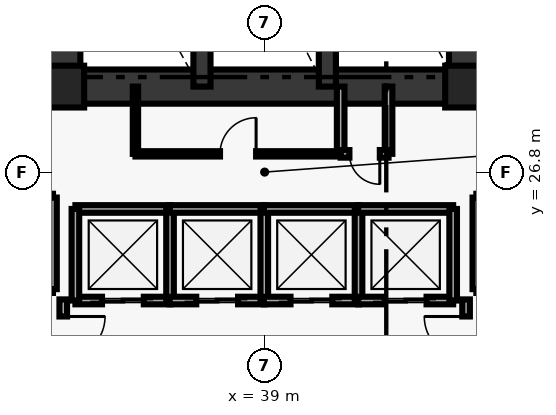
"""IFC4 building model, lengths in metres.
Left out: names, types, materials, properties, quantities, classifications, styles, units other than length and angle.
Written with IfcOpenShell. Run it as: python <this file> out.ifc"""

import sys

from ifc_helpers import new_model, si_unit, direction, frame, frame_2d, origin, origin_2d, place, context, subcontext, project, spatial, rectangle, extrude, element, fill, save


model = new_model("IFC4")
c1 = context("Model", 3, precision=1e-05, world=origin(), true_north=direction((0.0, 1.0)))
c2 = subcontext(c1, "Body", "Model", "MODEL_VIEW")
j1 = project(units=[si_unit("LENGTHUNIT", "METRE"), si_unit("PLANEANGLEUNIT", "RADIAN")], contexts=[c1])
p1 = place(None, origin())
s1 = spatial("IfcSite", under=j1, at=p1, CompositionType="ELEMENT")
p2 = place(p1, origin())
s2 = spatial("IfcBuilding", under=s1, at=p2, CompositionType="ELEMENT")
p3 = place(p2, origin())
s3 = spatial("IfcBuildingStorey", under=s2, at=p3, CompositionType="ELEMENT", Elevation=0.0)
for number, where, z_axis, x_axis in (
    (1, (44.3, 29.05, 0.0), (0.0, 0.0, 1.0), (1.0, 0.0, 0.0)),
    (2, (33.7, 29.05, 0.0), (0.0, 0.0, 1.0), (1.0, 0.0, 0.0)),
):
    element("IfcColumn", number, at=place(p3, frame(where, z_axis=z_axis, x_axis=x_axis)), inside=s3, PredefinedType="PILASTER", context=c2, shape_type="SweptSolid", body=[
        extrude(rectangle(XDim=1.1, YDim=1.1, at=origin_2d()), origin(), (0.0, 0.0, 1.0), 5.7),
    ])
for number, where, z_axis, x_axis in (
    (3, (33.7, 29.05, 0.0), (0.0, 0.0, 1.0), (0.0, 1.0, 0.0)),
    (4, (44.3, 29.05, 0.0), (0.0, 0.0, 1.0), (0.0, 1.0, 0.0)),
):
    element("IfcWall", number, at=place(p3, frame(where, z_axis=z_axis, x_axis=x_axis)), inside=s3, PredefinedType="SHEAR", context=c2, shape_type="SweptSolid", body=[
        extrude(rectangle(XDim=8.35, YDim=0.9, at=frame_2d((4.175, 0.0))), origin(), (0.0, 0.0, 1.0), 5.7),
    ])
p4 = place(p3, frame((33.7, 29.05, 0.0), z_axis=(0.0, 0.0, 1.0), x_axis=(1.0, 0.0, 0.0)))
e5 = element("IfcWall", 5, at=p4, inside=s3, PredefinedType="SHEAR", context=c2, shape_type="SweptSolid", body=[
    extrude(rectangle(XDim=10.6, YDim=0.9, at=frame_2d((5.3, 0.0))), origin(), (0.0, 0.0, 1.0), 5.7),
])
for number, where, z_axis, x_axis in (
    (6, (37.35, 29.05, 0.0), (0.0, 0.0, 1.0), (0.0, 1.0, 0.0)),
    (7, (40.65, 29.05, 0.0), (0.0, 0.0, 1.0), (0.0, 1.0, 0.0)),
):
    element("IfcWall", number, at=place(p3, frame(where, z_axis=z_axis, x_axis=x_axis)), inside=s3, PredefinedType="SHEAR", context=c2, shape_type="SweptSolid", body=[
        extrude(rectangle(XDim=8.35, YDim=0.45, at=frame_2d((4.175, 0.0))), origin(), (0.0, 0.0, 1.0), 5.7),
    ])
p5 = place(p3, frame((35.6, 27.28, 0.0), z_axis=(0.0, 0.0, 1.0), x_axis=(0.0, 1.0, 0.0)))
e8 = element("IfcWall", 8, at=p5, inside=s3, PredefinedType="PARTITIONING", context=c2, shape_type="SweptSolid", body=[
    extrude(rectangle(XDim=1.77, YDim=0.14, at=frame_2d((0.885, 0.0))), origin(), (0.0, 0.0, 1.0), 5.7),
])
for number, where, z_axis, x_axis in (
    (9, (41.0, 27.28, 0.0), (0.0, 0.0, 1.0), (0.0, 1.0, 0.0)),
    (10, (42.26, 27.28, 0.0), (0.0, 0.0, 1.0), (0.0, 1.0, 0.0)),
):
    element("IfcWall", number, at=place(p3, frame(where, z_axis=z_axis, x_axis=x_axis)), inside=s3, PredefinedType="SOLIDWALL", context=c2, shape_type="SweptSolid", body=[
        extrude(rectangle(XDim=1.77, YDim=0.2, at=frame_2d((0.885, 0.0))), origin(), (0.0, 0.0, 1.0), 5.7),
    ])
p6 = place(p3, frame((41.0, 27.28, 0.0), z_axis=(0.0, 0.0, 1.0), x_axis=(1.0, 0.0, 0.0)))
e11 = element("IfcWall", 11, at=p6, inside=s3, PredefinedType="SOLIDWALL", context=c2, shape_type="SweptSolid", body=[
    extrude(rectangle(XDim=1.26, YDim=0.2, at=frame_2d((0.63, 0.0))), origin(), (0.0, 0.0, 1.0), 5.7),
])
p7 = place(p6, frame((0.23, 0.0, 0.0)))
e12 = element("IfcOpeningElement", 12, at=p7, cuts=e11, PredefinedType="OPENING", context=c2, shape_type="SweptSolid", body=[
    extrude(rectangle(XDim=0.8, YDim=2.05, at=frame_2d((0.4, 1.025))), frame((0.0, 0.11, 0.0), z_axis=(0.0, -1.0, 0.0), x_axis=(1.0, 0.0, 0.0)), (0.0, 0.0, 1.0), 0.22),
])
p8 = place(p3, frame((31.32, 23.72, 0.0), z_axis=(0.0, 0.0, 1.0), x_axis=(1.0, 0.0, 0.0)))
e13 = element("IfcWall", 13, at=p8, inside=s3, PredefinedType="SOLIDWALL", context=c2, shape_type="SweptSolid", body=[
    extrude(rectangle(XDim=2.11, YDim=0.2, at=frame_2d((1.055, 0.0))), origin(), (0.0, 0.0, 1.0), 5.7),
])
p9 = place(p8, frame((0.505, 0.0, 0.0)))
e14 = element("IfcOpeningElement", 14, at=p9, cuts=e13, PredefinedType="OPENING", context=c2, shape_type="SweptSolid", body=[
    extrude(rectangle(XDim=1.1, YDim=2.15, at=frame_2d((0.55, 1.075))), frame((0.0, 0.11, 0.0), z_axis=(0.0, -1.0, 0.0), x_axis=(1.0, 0.0, 0.0)), (0.0, 0.0, 1.0), 0.22),
])
p10 = place(p3, frame((31.32, 26.13, 0.0), z_axis=(0.0, 0.0, 1.0), x_axis=(1.0, 0.0, 0.0)))
e15 = element("IfcWall", 15, at=p10, inside=s3, PredefinedType="SOLIDWALL", context=c2, shape_type="SweptSolid", body=[
    extrude(rectangle(XDim=2.11, YDim=0.2, at=frame_2d((1.055, 0.0))), origin(), (0.0, 0.0, 1.0), 5.7),
])
p11 = place(p3, frame((33.43, 23.72, 0.0), z_axis=(0.0, 0.0, 1.0), x_axis=(0.0, 1.0, 0.0)))
e16 = element("IfcWall", 16, at=p11, inside=s3, PredefinedType="SOLIDWALL", context=c2, shape_type="SweptSolid", body=[
    extrude(rectangle(XDim=2.41, YDim=0.2, at=frame_2d((1.205, 0.0))), origin(), (0.0, 0.0, 1.0), 5.7),
])
p12 = place(p3, frame((44.57, 23.72, 0.0), z_axis=(0.0, 0.0, 1.0), x_axis=(1.0, 0.0, 0.0)))
e17 = element("IfcWall", 17, at=p12, inside=s3, PredefinedType="SOLIDWALL", context=c2, shape_type="SweptSolid", body=[
    extrude(rectangle(XDim=2.11, YDim=0.2, at=frame_2d((1.055, 0.0))), origin(), (0.0, 0.0, 1.0), 5.7),
])
p13 = place(p12, frame((0.505, 0.0, 0.0)))
e18 = element("IfcOpeningElement", 18, at=p13, cuts=e17, PredefinedType="OPENING", context=c2, shape_type="SweptSolid", body=[
    extrude(rectangle(XDim=1.1, YDim=2.15, at=frame_2d((0.55, 1.075))), frame((0.0, 0.11, 0.0), z_axis=(0.0, -1.0, 0.0), x_axis=(1.0, 0.0, 0.0)), (0.0, 0.0, 1.0), 0.22),
])
p14 = place(p3, frame((44.57, 26.13, 0.0), z_axis=(0.0, 0.0, 1.0), x_axis=(1.0, 0.0, 0.0)))
e19 = element("IfcWall", 19, at=p14, inside=s3, PredefinedType="SOLIDWALL", context=c2, shape_type="SweptSolid", body=[
    extrude(rectangle(XDim=2.11, YDim=0.2, at=frame_2d((1.055, 0.0))), origin(), (0.0, 0.0, 1.0), 5.7),
])
p15 = place(p3, frame((44.57, 23.72, 0.0), z_axis=(0.0, 0.0, 1.0), x_axis=(0.0, 1.0, 0.0)))
e20 = element("IfcWall", 20, at=p15, inside=s3, PredefinedType="SOLIDWALL", context=c2, shape_type="SweptSolid", body=[
    extrude(rectangle(XDim=2.41, YDim=0.2, at=frame_2d((1.205, 0.0))), origin(), (0.0, 0.0, 1.0), 5.7),
])
p16 = place(p3, frame((34.02, 23.42, 0.0), z_axis=(0.0, 0.0, 1.0), x_axis=(1.0, 0.0, 0.0)))
e21 = element("IfcWall", 21, at=p16, inside=s3, PredefinedType="SOLIDWALL", context=c2, shape_type="SweptSolid", body=[
    extrude(rectangle(XDim=2.5, YDim=0.2, at=frame_2d((1.25, 0.0))), origin(), (0.0, 0.0, 1.0), 5.7),
])
p17 = place(p16, frame((0.7, 0.0, 0.0)))
e22 = element("IfcOpeningElement", 22, at=p17, cuts=e21, PredefinedType="OPENING", context=c2, shape_type="SweptSolid", body=[
    extrude(rectangle(XDim=1.1, YDim=2.15, at=frame_2d((0.55, 1.075))), frame((0.0, 0.11, 0.0), z_axis=(0.0, -1.0, 0.0), x_axis=(1.0, 0.0, 0.0)), (0.0, 0.0, 1.0), 0.22),
])
p18 = place(p3, frame((34.02, 25.83, 0.0), z_axis=(0.0, 0.0, 1.0), x_axis=(1.0, 0.0, 0.0)))
e23 = element("IfcWall", 23, at=p18, inside=s3, PredefinedType="SOLIDWALL", context=c2, shape_type="SweptSolid", body=[
    extrude(rectangle(XDim=2.5, YDim=0.2, at=frame_2d((1.25, 0.0))), origin(), (0.0, 0.0, 1.0), 5.7),
])
for number, where, z_axis, x_axis in (
    (24, (34.02, 23.42, 0.0), (0.0, 0.0, 1.0), (0.0, 1.0, 0.0)),
    (25, (36.51, 23.42, 0.0), (0.0, 0.0, 1.0), (0.0, 1.0, 0.0)),
):
    element("IfcWall", number, at=place(p3, frame(where, z_axis=z_axis, x_axis=x_axis)), inside=s3, PredefinedType="SOLIDWALL", context=c2, shape_type="SweptSolid", body=[
        extrude(rectangle(XDim=2.41, YDim=0.2, at=frame_2d((1.205, 0.0))), origin(), (0.0, 0.0, 1.0), 5.7),
    ])
p19 = place(p3, frame((36.5, 23.42, 0.0), z_axis=(0.0, 0.0, 1.0), x_axis=(1.0, 0.0, 0.0)))
e26 = element("IfcWall", 26, at=p19, inside=s3, PredefinedType="SOLIDWALL", context=c2, shape_type="SweptSolid", body=[
    extrude(rectangle(XDim=2.5, YDim=0.2, at=frame_2d((1.25, 0.0))), origin(), (0.0, 0.0, 1.0), 5.7),
])
p20 = place(p19, frame((0.7, 0.0, 0.0)))
e27 = element("IfcOpeningElement", 27, at=p20, cuts=e26, PredefinedType="OPENING", context=c2, shape_type="SweptSolid", body=[
    extrude(rectangle(XDim=1.1, YDim=2.15, at=frame_2d((0.55, 1.075))), frame((0.0, 0.11, 0.0), z_axis=(0.0, -1.0, 0.0), x_axis=(1.0, 0.0, 0.0)), (0.0, 0.0, 1.0), 0.22),
])
p21 = place(p3, frame((36.5, 25.83, 0.0), z_axis=(0.0, 0.0, 1.0), x_axis=(1.0, 0.0, 0.0)))
e28 = element("IfcWall", 28, at=p21, inside=s3, PredefinedType="SOLIDWALL", context=c2, shape_type="SweptSolid", body=[
    extrude(rectangle(XDim=2.5, YDim=0.2, at=frame_2d((1.25, 0.0))), origin(), (0.0, 0.0, 1.0), 5.7),
])
p22 = place(p3, frame((38.99, 23.42, 0.0), z_axis=(0.0, 0.0, 1.0), x_axis=(0.0, 1.0, 0.0)))
e29 = element("IfcWall", 29, at=p22, inside=s3, PredefinedType="SOLIDWALL", context=c2, shape_type="SweptSolid", body=[
    extrude(rectangle(XDim=2.41, YDim=0.2, at=frame_2d((1.205, 0.0))), origin(), (0.0, 0.0, 1.0), 5.7),
])
p23 = place(p3, frame((38.98, 23.42, 0.0), z_axis=(0.0, 0.0, 1.0), x_axis=(1.0, 0.0, 0.0)))
e30 = element("IfcWall", 30, at=p23, inside=s3, PredefinedType="SOLIDWALL", context=c2, shape_type="SweptSolid", body=[
    extrude(rectangle(XDim=2.5, YDim=0.2, at=frame_2d((1.25, 0.0))), origin(), (0.0, 0.0, 1.0), 5.7),
])
p24 = place(p23, frame((0.7, 0.0, 0.0)))
e31 = element("IfcOpeningElement", 31, at=p24, cuts=e30, PredefinedType="OPENING", context=c2, shape_type="SweptSolid", body=[
    extrude(rectangle(XDim=1.1, YDim=2.15, at=frame_2d((0.55, 1.075))), frame((0.0, 0.11, 0.0), z_axis=(0.0, -1.0, 0.0), x_axis=(1.0, 0.0, 0.0)), (0.0, 0.0, 1.0), 0.22),
])
p25 = place(p3, frame((38.98, 25.83, 0.0), z_axis=(0.0, 0.0, 1.0), x_axis=(1.0, 0.0, 0.0)))
e32 = element("IfcWall", 32, at=p25, inside=s3, PredefinedType="SOLIDWALL", context=c2, shape_type="SweptSolid", body=[
    extrude(rectangle(XDim=2.5, YDim=0.2, at=frame_2d((1.25, 0.0))), origin(), (0.0, 0.0, 1.0), 5.7),
])
p26 = place(p3, frame((41.47, 23.42, 0.0), z_axis=(0.0, 0.0, 1.0), x_axis=(0.0, 1.0, 0.0)))
e33 = element("IfcWall", 33, at=p26, inside=s3, PredefinedType="SOLIDWALL", context=c2, shape_type="SweptSolid", body=[
    extrude(rectangle(XDim=2.41, YDim=0.2, at=frame_2d((1.205, 0.0))), origin(), (0.0, 0.0, 1.0), 5.7),
])
p27 = place(p3, frame((41.46, 23.42, 0.0), z_axis=(0.0, 0.0, 1.0), x_axis=(1.0, 0.0, 0.0)))
e34 = element("IfcWall", 34, at=p27, inside=s3, PredefinedType="SOLIDWALL", context=c2, shape_type="SweptSolid", body=[
    extrude(rectangle(XDim=2.5, YDim=0.2, at=frame_2d((1.25, 0.0))), origin(), (0.0, 0.0, 1.0), 5.7),
])
p28 = place(p27, frame((0.7, 0.0, 0.0)))
e35 = element("IfcOpeningElement", 35, at=p28, cuts=e34, PredefinedType="OPENING", context=c2, shape_type="SweptSolid", body=[
    extrude(rectangle(XDim=1.1, YDim=2.15, at=frame_2d((0.55, 1.075))), frame((0.0, 0.11, 0.0), z_axis=(0.0, -1.0, 0.0), x_axis=(1.0, 0.0, 0.0)), (0.0, 0.0, 1.0), 0.22),
])
p29 = place(p3, frame((41.46, 25.83, 0.0), z_axis=(0.0, 0.0, 1.0), x_axis=(1.0, 0.0, 0.0)))
e36 = element("IfcWall", 36, at=p29, inside=s3, PredefinedType="SOLIDWALL", context=c2, shape_type="SweptSolid", body=[
    extrude(rectangle(XDim=2.5, YDim=0.2, at=frame_2d((1.25, 0.0))), origin(), (0.0, 0.0, 1.0), 5.7),
])
p30 = place(p3, frame((43.96, 23.42, 0.0), z_axis=(0.0, 0.0, 1.0), x_axis=(0.0, 1.0, 0.0)))
e37 = element("IfcWall", 37, at=p30, inside=s3, PredefinedType="SOLIDWALL", context=c2, shape_type="SweptSolid", body=[
    extrude(rectangle(XDim=2.41, YDim=0.2, at=frame_2d((1.205, 0.0))), origin(), (0.0, 0.0, 1.0), 5.7),
])
p31 = place(p3, frame((33.7, 21.35, 0.0), z_axis=(0.0, 0.0, 1.0), x_axis=(0.0, 1.0, 0.0)))
e38 = element("IfcWall", 38, at=p31, inside=s3, PredefinedType="SOLIDWALL", context=c2, shape_type="SweptSolid", body=[
    extrude(rectangle(XDim=2.1, YDim=0.2, at=frame_2d((1.05, 0.0))), origin(), (0.0, 0.0, 1.0), 4.92),
])
p32 = place(p31, frame((0.55, 0.0, 0.0)))
e39 = element("IfcOpeningElement", 39, at=p32, cuts=e38, PredefinedType="OPENING", context=c2, shape_type="SweptSolid", body=[
    extrude(rectangle(XDim=1.1, YDim=2.15, at=frame_2d((0.55, 1.075))), frame((0.0, 0.11, 0.0), z_axis=(0.0, -1.0, 0.0), x_axis=(1.0, 0.0, 0.0)), (0.0, 0.0, 1.0), 0.22),
])
p33 = place(p3, frame((44.3, 23.45, 0.0), z_axis=(0.0, 0.0, 1.0), x_axis=(0.0, -1.0, 0.0)))
e40 = element("IfcWall", 40, at=p33, inside=s3, PredefinedType="SOLIDWALL", context=c2, shape_type="SweptSolid", body=[
    extrude(rectangle(XDim=2.1, YDim=0.2, at=frame_2d((1.05, 0.0))), origin(), (0.0, 0.0, 1.0), 4.92),
])
p34 = place(p33, frame((0.45, 0.0, 0.0)))
e41 = element("IfcOpeningElement", 41, at=p34, cuts=e40, PredefinedType="OPENING", context=c2, shape_type="SweptSolid", body=[
    extrude(rectangle(XDim=1.1, YDim=2.15, at=frame_2d((0.55, 1.075))), frame((0.0, 0.11, 0.0), z_axis=(0.0, -1.0, 0.0), x_axis=(1.0, 0.0, 0.0)), (0.0, 0.0, 1.0), 0.22),
])
p35 = place(p3, frame((35.6, 27.28, 0.0), z_axis=(0.0, 0.0, 1.0), x_axis=(1.0, 0.0, 0.0)))
e42 = element("IfcWall", 42, at=p35, inside=s3, PredefinedType="PARTITIONING", context=c2, shape_type="SweptSolid", body=[
    extrude(rectangle(XDim=5.4, YDim=0.14, at=frame_2d((2.7, 0.0))), origin(), (0.0, 0.0, 1.0), 5.7),
])
p36 = place(p35, frame((2.225, 0.0, 0.0)))
e43 = element("IfcOpeningElement", 43, at=p36, cuts=e42, PredefinedType="OPENING", context=c2, shape_type="SweptSolid", body=[
    extrude(rectangle(XDim=0.95, YDim=2.1, at=frame_2d((0.475, 1.05))), frame((0.0, 0.08, 0.0), z_axis=(0.0, -1.0, 0.0), x_axis=(1.0, 0.0, 0.0)), (0.0, 0.0, 1.0), 0.16),
])
p37 = place(p3, frame((30.85, 29.05, 0.0), z_axis=(0.0, 0.0, 1.0), x_axis=(1.0, 0.0, 0.0)))
e44 = element("IfcWall", 44, at=p37, inside=s3, PredefinedType="PARTITIONING", context=c2, shape_type="SweptSolid", body=[
    extrude(rectangle(XDim=2.6, YDim=0.14, at=frame_2d((1.3, 0.0))), origin(), (0.0, 0.0, 1.0), 4.66),
])
p38 = place(p37, frame((0.9, 0.0, 0.0)))
e45 = element("IfcOpeningElement", 45, at=p38, cuts=e44, PredefinedType="OPENING", context=c2, shape_type="SweptSolid", body=[
    extrude(rectangle(XDim=0.8, YDim=2.05, at=frame_2d((0.4, 1.025))), frame((0.0, 0.08, 0.0), z_axis=(0.0, -1.0, 0.0), x_axis=(1.0, 0.0, 0.0)), (0.0, 0.0, 1.0), 0.16),
])
p39 = place(p7, origin())
e46 = element("IfcDoor", 46, at=p39, inside=s3, OperationType="SINGLE_SWING_RIGHT", PredefinedType="DOOR", context=c2, shape_type="SweptSolid", body=[
    extrude(rectangle(XDim=0.8, YDim=2.05, at=frame_2d((0.4, 1.025))), frame((0.0, 0.025, 0.0), z_axis=(0.0, -1.0, 0.0), x_axis=(1.0, 0.0, 0.0)), (0.0, 0.0, 1.0), 0.05),
])
fill(e12, e46)
p40 = place(p17, origin())
e47 = element("IfcDoor", 47, at=p40, inside=s3, OperationType="DOUBLE_DOOR_SLIDING", PredefinedType="DOOR", context=c2, shape_type="SweptSolid", body=[
    extrude(rectangle(XDim=1.1, YDim=2.15, at=frame_2d((0.55, 1.075))), frame((0.0, 0.025, 0.0), z_axis=(0.0, -1.0, 0.0), x_axis=(1.0, 0.0, 0.0)), (0.0, 0.0, 1.0), 0.05),
])
fill(e22, e47)
p41 = place(p20, origin())
e48 = element("IfcDoor", 48, at=p41, inside=s3, OperationType="DOUBLE_DOOR_SLIDING", PredefinedType="DOOR", context=c2, shape_type="SweptSolid", body=[
    extrude(rectangle(XDim=1.1, YDim=2.15, at=frame_2d((0.55, 1.075))), frame((0.0, 0.025, 0.0), z_axis=(0.0, -1.0, 0.0), x_axis=(1.0, 0.0, 0.0)), (0.0, 0.0, 1.0), 0.05),
])
fill(e27, e48)
p42 = place(p24, origin())
e49 = element("IfcDoor", 49, at=p42, inside=s3, OperationType="DOUBLE_DOOR_SLIDING", PredefinedType="DOOR", context=c2, shape_type="SweptSolid", body=[
    extrude(rectangle(XDim=1.1, YDim=2.15, at=frame_2d((0.55, 1.075))), frame((0.0, 0.025, 0.0), z_axis=(0.0, -1.0, 0.0), x_axis=(1.0, 0.0, 0.0)), (0.0, 0.0, 1.0), 0.05),
])
fill(e31, e49)
p43 = place(p28, origin())
e50 = element("IfcDoor", 50, at=p43, inside=s3, OperationType="DOUBLE_DOOR_SLIDING", PredefinedType="DOOR", context=c2, shape_type="SweptSolid", body=[
    extrude(rectangle(XDim=1.1, YDim=2.15, at=frame_2d((0.55, 1.075))), frame((0.0, 0.025, 0.0), z_axis=(0.0, -1.0, 0.0), x_axis=(1.0, 0.0, 0.0)), (0.0, 0.0, 1.0), 0.05),
])
fill(e35, e50)
p44 = place(p32, origin())
e51 = element("IfcDoor", 51, at=p44, inside=s3, OperationType="SINGLE_SWING_RIGHT", PredefinedType="DOOR", context=c2, shape_type="SweptSolid", body=[
    extrude(rectangle(XDim=1.1, YDim=2.15, at=frame_2d((0.55, 1.075))), frame((0.0, 0.025, 0.0), z_axis=(0.0, -1.0, 0.0), x_axis=(1.0, 0.0, 0.0)), (0.0, 0.0, 1.0), 0.05),
])
fill(e39, e51)
p45 = place(p34, origin())
e52 = element("IfcDoor", 52, at=p45, inside=s3, OperationType="SINGLE_SWING_LEFT", PredefinedType="DOOR", context=c2, shape_type="SweptSolid", body=[
    extrude(rectangle(XDim=1.1, YDim=2.15, at=frame_2d((0.55, 1.075))), frame((0.0, 0.025, 0.0), z_axis=(0.0, -1.0, 0.0), x_axis=(1.0, 0.0, 0.0)), (0.0, 0.0, 1.0), 0.05),
])
fill(e41, e52)
p46 = place(p36, origin())
e53 = element("IfcDoor", 53, at=p46, inside=s3, OperationType="SINGLE_SWING_RIGHT", PredefinedType="DOOR", context=c2, shape_type="SweptSolid", body=[
    extrude(rectangle(XDim=0.95, YDim=2.1, at=frame_2d((0.475, 1.05))), frame((0.0, 0.025, 0.0), z_axis=(0.0, -1.0, 0.0), x_axis=(1.0, 0.0, 0.0)), (0.0, 0.0, 1.0), 0.05),
])
fill(e43, e53)
save(model, sys.argv[1])
